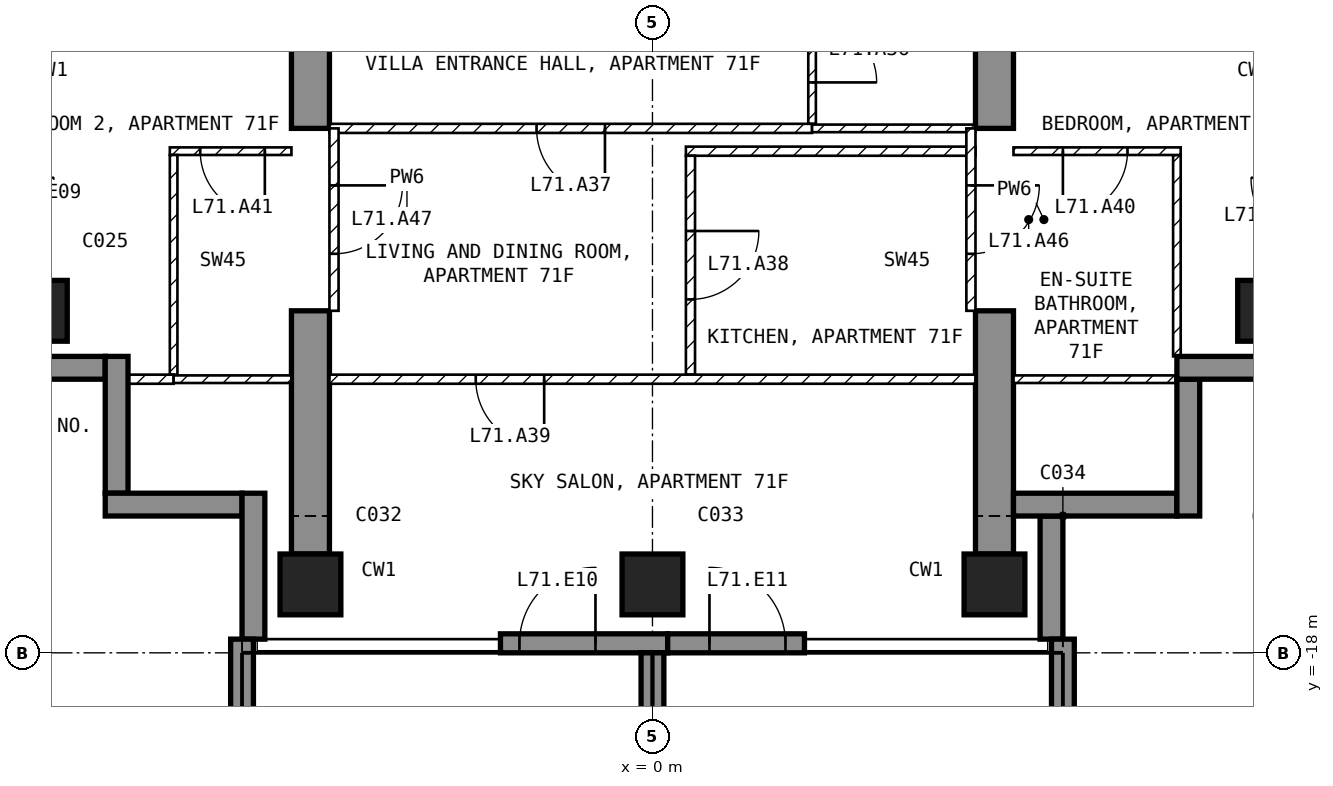
"""IFC4 building model, lengths in metres.
Left out: names, types, materials, properties, quantities, classifications, styles, units other than length and angle.
Written with IfcOpenShell. Run it as: python <this file> out.ifc"""

import sys

from ifc_helpers import new_model, si_unit, direction, frame, frame_2d, origin, origin_2d, place, context, subcontext, project, spatial, polyline, rectangle, outline, extrude, element, fill, save


model = new_model("IFC4")
c1 = context("Model", 3, precision=1e-05, world=origin(), true_north=direction((0.0, 1.0)))
c2 = subcontext(c1, "Body", "Model", "MODEL_VIEW")
j1 = project(units=[si_unit("LENGTHUNIT", "METRE"), si_unit("PLANEANGLEUNIT", "RADIAN")], contexts=[c1])
p1 = place(None, origin())
s1 = spatial("IfcSite", under=j1, at=p1, CompositionType="ELEMENT")
p2 = place(p1, origin())
s2 = spatial("IfcBuilding", under=s1, at=p2, CompositionType="ELEMENT")
p3 = place(p2, frame((0.0, 0.0, 278.0)))
s3 = spatial("IfcBuildingStorey", under=s2, at=p3, CompositionType="ELEMENT", Elevation=278.0)
for number, where, z_axis, x_axis in (
    (1, (-8.1, -13.5, -0.25), (0.0, 0.0, 1.0), (1.0, 0.0, 0.0)),
    (2, (-4.5, -17.1, -0.25), (0.0, 0.0, 1.0), (1.0, 0.0, 0.0)),
    (3, (0.0, -17.1, -0.25), (0.0, 0.0, 1.0), (1.0, 0.0, 0.0)),
    (4, (4.5, -17.1, -0.25), (0.0, 0.0, 1.0), (1.0, 0.0, 0.0)),
    (5, (8.1, -13.5, -0.25), (0.0, 0.0, 1.0), (1.0, 0.0, 0.0)),
):
    element("IfcColumn", number, at=place(p3, frame(where, z_axis=z_axis, x_axis=x_axis)), inside=s3, PredefinedType="COLUMN", context=c2, shape_type="SweptSolid", body=[
        extrude(rectangle(XDim=0.8, YDim=0.8, at=origin_2d()), origin(), (0.0, 0.0, 1.0), 3.5),
    ])
for number, where, z_axis, x_axis in (
    (6, (-4.75, -16.7, -0.25), (1.0, 0.0, 0.0), (0.0, 1.0, 0.0)),
    (7, (4.25, -16.7, -0.25), (1.0, 0.0, 0.0), (0.0, 1.0, 0.0)),
):
    element("IfcWall", number, at=place(p3, frame(where, z_axis=z_axis, x_axis=x_axis)), inside=s3, PredefinedType="SHEAR", context=c2, shape_type="SweptSolid", body=[
        extrude(outline(polyline([(0.0, 0.0), (3.2, 0.0), (3.2, 2.65), (5.6, 2.65), (5.6, 0.0), (7.7, 0.0), (7.7, 3.5), (0.0, 3.5), (0.0, 0.0)])), origin(), (0.0, 0.0, 1.0), 0.5),
    ])
p4 = place(p3, frame((-2.0, -17.875, 0.0), z_axis=(0.0, 0.0, 1.0), x_axis=(1.0, 0.0, 0.0)))
e8 = element("IfcWall", 8, at=p4, inside=s3, PredefinedType="SOLIDWALL", context=c2, shape_type="SweptSolid", body=[
    extrude(rectangle(XDim=2.2, YDim=0.25, at=frame_2d((1.1, 0.0))), origin(), (0.0, 0.0, 1.0), 3.25),
])
p5 = place(p4, frame((0.25, 0.0, 0.0)))
e9 = element("IfcOpeningElement", 9, at=p5, cuts=e8, PredefinedType="OPENING", context=c2, shape_type="SweptSolid", body=[
    extrude(rectangle(XDim=1.0, YDim=2.4, at=frame_2d((0.5, 1.2))), frame((0.0, 0.135, 0.0), z_axis=(0.0, -1.0, 0.0), x_axis=(1.0, 0.0, 0.0)), (0.0, 0.0, 1.0), 0.27),
])
p6 = place(p3, frame((0.2, -17.875, 0.0), z_axis=(0.0, 0.0, 1.0), x_axis=(1.0, 0.0, 0.0)))
e10 = element("IfcWall", 10, at=p6, inside=s3, PredefinedType="SOLIDWALL", context=c2, shape_type="SweptSolid", body=[
    extrude(rectangle(XDim=1.8, YDim=0.25, at=frame_2d((0.9, 0.0))), origin(), (0.0, 0.0, 1.0), 3.25),
])
p7 = place(p6, frame((0.55, 0.0, 0.0)))
e11 = element("IfcOpeningElement", 11, at=p7, cuts=e10, PredefinedType="OPENING", context=c2, shape_type="SweptSolid", body=[
    extrude(rectangle(XDim=1.0, YDim=2.4, at=frame_2d((0.5, 1.2))), frame((0.0, 0.135, 0.0), z_axis=(0.0, -1.0, 0.0), x_axis=(1.0, 0.0, 0.0)), (0.0, 0.0, 1.0), 0.27),
])
p8 = place(p3, frame((5.25, -17.82, 0.0), z_axis=(0.0, 0.0, 1.0), x_axis=(0.0, 1.0, 0.0)))
e12 = element("IfcWall", 12, at=p8, inside=s3, PredefinedType="SOLIDWALL", context=c2, shape_type="SweptSolid", body=[
    extrude(rectangle(XDim=1.62, YDim=0.3, at=frame_2d((0.81, 0.0))), origin(), (0.0, 0.0, 1.0), 3.25),
])
p9 = place(p3, frame((4.75, -16.05, 0.0), z_axis=(0.0, 0.0, 1.0), x_axis=(1.0, 0.0, 0.0)))
e13 = element("IfcWall", 13, at=p9, inside=s3, PredefinedType="SOLIDWALL", context=c2, shape_type="SweptSolid", body=[
    extrude(rectangle(XDim=2.15, YDim=0.3, at=frame_2d((1.075, 0.0))), origin(), (0.0, 0.0, 1.0), 3.25),
])
p10 = place(p3, frame((7.05, -16.2, 0.0), z_axis=(0.0, 0.0, 1.0), x_axis=(0.0, 1.0, 0.0)))
e14 = element("IfcWall", 14, at=p10, inside=s3, PredefinedType="SOLIDWALL", context=c2, shape_type="SweptSolid", body=[
    extrude(rectangle(XDim=1.8, YDim=0.3, at=frame_2d((0.9, 0.0))), origin(), (0.0, 0.0, 1.0), 3.25),
])
p11 = place(p3, frame((6.9, -14.25, 0.0), z_axis=(0.0, 0.0, 1.0), x_axis=(1.0, 0.0, 0.0)))
e15 = element("IfcWall", 15, at=p11, inside=s3, PredefinedType="SOLIDWALL", context=c2, shape_type="SweptSolid", body=[
    extrude(rectangle(XDim=1.85, YDim=0.3, at=frame_2d((0.925, 0.0))), origin(), (0.0, 0.0, 1.0), 3.25),
])
p12 = place(p3, frame((-8.75, -14.25, 0.0), z_axis=(0.0, 0.0, 1.0), x_axis=(1.0, 0.0, 0.0)))
e16 = element("IfcWall", 16, at=p12, inside=s3, PredefinedType="SOLIDWALL", context=c2, shape_type="SweptSolid", body=[
    extrude(rectangle(XDim=1.55, YDim=0.3, at=frame_2d((0.775, 0.0))), origin(), (0.0, 0.0, 1.0), 3.25),
])
p13 = place(p3, frame((-7.05, -14.1, 0.0), z_axis=(0.0, 0.0, 1.0), x_axis=(0.0, -1.0, 0.0)))
e17 = element("IfcWall", 17, at=p13, inside=s3, PredefinedType="SOLIDWALL", context=c2, shape_type="SweptSolid", body=[
    extrude(rectangle(XDim=1.8, YDim=0.3, at=frame_2d((0.9, 0.0))), origin(), (0.0, 0.0, 1.0), 3.25),
])
p14 = place(p3, frame((-7.2, -16.05, 0.0), z_axis=(0.0, 0.0, 1.0), x_axis=(1.0, 0.0, 0.0)))
e18 = element("IfcWall", 18, at=p14, inside=s3, PredefinedType="SOLIDWALL", context=c2, shape_type="SweptSolid", body=[
    extrude(rectangle(XDim=1.8, YDim=0.3, at=frame_2d((0.9, 0.0))), origin(), (0.0, 0.0, 1.0), 3.25),
])
p15 = place(p3, frame((-5.25, -15.9, 0.0), z_axis=(0.0, 0.0, 1.0), x_axis=(0.0, -1.0, 0.0)))
e19 = element("IfcWall", 19, at=p15, inside=s3, PredefinedType="SOLIDWALL", context=c2, shape_type="SweptSolid", body=[
    extrude(rectangle(XDim=1.92, YDim=0.3, at=frame_2d((0.96, 0.0))), origin(), (0.0, 0.0, 1.0), 3.25),
])
p16 = place(p3, frame((-5.4, -17.82, 0.0), z_axis=(0.0, 0.0, 1.0), x_axis=(0.0, -1.0, 0.0)))
e20 = element("IfcWall", 20, at=p16, inside=s3, PredefinedType="SOLIDWALL", context=c2, shape_type="SweptSolid", body=[
    extrude(rectangle(XDim=2.88, YDim=0.3, at=frame_2d((1.44, 0.0))), origin(), (0.0, 0.0, 1.0), 3.25),
])
p17 = place(p3, frame((0.0, -18.0, 0.0), z_axis=(0.0, 0.0, 1.0), x_axis=(0.0, -1.0, 0.0)))
e21 = element("IfcWall", 21, at=p17, inside=s3, PredefinedType="SOLIDWALL", context=c2, shape_type="SweptSolid", body=[
    extrude(rectangle(XDim=2.7, YDim=0.3, at=frame_2d((1.35, 0.0))), origin(), (0.0, 0.0, 1.0), 3.25),
])
p18 = place(p3, frame((5.4, -17.82, 0.0), z_axis=(0.0, 0.0, 1.0), x_axis=(0.0, -1.0, 0.0)))
e22 = element("IfcWall", 22, at=p18, inside=s3, PredefinedType="SOLIDWALL", context=c2, shape_type="SweptSolid", body=[
    extrude(rectangle(XDim=2.88, YDim=0.3, at=frame_2d((1.44, 0.0))), origin(), (0.0, 0.0, 1.0), 3.25),
])
p19 = place(p3, frame((2.1, -9.1, 0.0), z_axis=(0.0, 0.0, 1.0), x_axis=(0.0, -1.0, 0.0)))
e23 = element("IfcWall", 23, at=p19, inside=s3, PredefinedType="PARTITIONING", context=c2, shape_type="SweptSolid", body=[
    extrude(rectangle(XDim=1.94, YDim=0.1, at=frame_2d((0.97, 0.0))), origin(), (0.0, 0.0, 1.0), 3.25),
])
p20 = place(p19, frame((0.545, 0.0, 0.0)))
e24 = element("IfcOpeningElement", 24, at=p20, cuts=e23, PredefinedType="OPENING", context=c2, shape_type="SweptSolid", body=[
    extrude(rectangle(XDim=0.85, YDim=2.1, at=frame_2d((0.425, 1.05))), frame((0.0, 0.06, 0.0), z_axis=(0.0, -1.0, 0.0), x_axis=(1.0, 0.0, 0.0)), (0.0, 0.0, 1.0), 0.12),
])
p21 = place(p3, frame((2.1, -11.1, 0.0), z_axis=(0.0, 0.0, 1.0), x_axis=(-1.0, 0.0, 0.0)))
e25 = element("IfcWall", 25, at=p21, inside=s3, PredefinedType="PARTITIONING", context=c2, shape_type="SweptSolid", body=[
    extrude(rectangle(XDim=6.35, YDim=0.12, at=frame_2d((3.175, 0.0))), origin(), (0.0, 0.0, 1.0), 3.25),
])
p22 = place(p21, frame((2.725, 0.0, 0.0)))
e26 = element("IfcOpeningElement", 26, at=p22, cuts=e25, PredefinedType="OPENING", context=c2, shape_type="SweptSolid", body=[
    extrude(rectangle(XDim=0.9, YDim=2.1, at=frame_2d((0.45, 1.05))), frame((0.0, 0.07, 0.0), z_axis=(0.0, -1.0, 0.0), x_axis=(1.0, 0.0, 0.0)), (0.0, 0.0, 1.0), 0.14),
])
p23 = place(p3, frame((4.25, -11.1, 0.0), z_axis=(0.0, 0.0, 1.0), x_axis=(-1.0, 0.0, 0.0)))
e27 = element("IfcWall", 27, at=p23, inside=s3, PredefinedType="PARTITIONING", context=c2, shape_type="SweptSolid", body=[
    extrude(rectangle(XDim=2.15, YDim=0.1, at=frame_2d((1.075, 0.0))), origin(), (0.0, 0.0, 1.0), 3.25),
])
p24 = place(p3, frame((4.25, -11.4, 0.0), z_axis=(0.0, 0.0, 1.0), x_axis=(-1.0, 0.0, 0.0)))
e28 = element("IfcWall", 28, at=p24, inside=s3, PredefinedType="PARTITIONING", context=c2, shape_type="SweptSolid", body=[
    extrude(rectangle(XDim=3.81, YDim=0.12, at=frame_2d((1.905, 0.0))), origin(), (0.0, 0.0, 1.0), 3.25),
])
p25 = place(p3, frame((0.5, -11.46, 0.0), z_axis=(0.0, 0.0, 1.0), x_axis=(0.0, -1.0, 0.0)))
e29 = element("IfcWall", 29, at=p25, inside=s3, PredefinedType="PARTITIONING", context=c2, shape_type="SweptSolid", body=[
    extrude(rectangle(XDim=2.88, YDim=0.12, at=frame_2d((1.44, 0.0))), origin(), (0.0, 0.0, 1.0), 3.25),
])
p26 = place(p25, frame((0.99, 0.0, 0.0)))
e30 = element("IfcOpeningElement", 30, at=p26, cuts=e29, PredefinedType="OPENING", context=c2, shape_type="SweptSolid", body=[
    extrude(rectangle(XDim=0.9, YDim=2.1, at=frame_2d((0.45, 1.05))), frame((0.0, 0.07, 0.0), z_axis=(0.0, -1.0, 0.0), x_axis=(1.0, 0.0, 0.0)), (0.0, 0.0, 1.0), 0.14),
])
p27 = place(p3, frame((4.25, -14.4, 0.0), z_axis=(0.0, 0.0, 1.0), x_axis=(-1.0, 0.0, 0.0)))
e31 = element("IfcWall", 31, at=p27, inside=s3, PredefinedType="PARTITIONING", context=c2, shape_type="SweptSolid", body=[
    extrude(rectangle(XDim=8.5, YDim=0.12, at=frame_2d((4.25, 0.0))), origin(), (0.0, 0.0, 1.0), 3.25),
])
p28 = place(p27, frame((5.675, 0.0, 0.0)))
e32 = element("IfcOpeningElement", 32, at=p28, cuts=e31, PredefinedType="OPENING", context=c2, shape_type="SweptSolid", body=[
    extrude(rectangle(XDim=0.9, YDim=2.1, at=frame_2d((0.45, 1.05))), frame((0.0, 0.07, 0.0), z_axis=(0.0, -1.0, 0.0), x_axis=(1.0, 0.0, 0.0)), (0.0, 0.0, 1.0), 0.14),
])
p29 = place(p3, frame((6.9, -14.1, 0.0), z_axis=(0.0, 0.0, 1.0), x_axis=(0.0, 1.0, 0.0)))
e33 = element("IfcWall", 33, at=p29, inside=s3, PredefinedType="PARTITIONING", context=c2, shape_type="SweptSolid", body=[
    extrude(rectangle(XDim=2.65, YDim=0.1, at=frame_2d((1.325, 0.0))), origin(), (0.0, 0.0, 1.0), 3.25),
])
p30 = place(p3, frame((6.95, -11.4, 0.0), z_axis=(0.0, 0.0, 1.0), x_axis=(-1.0, 0.0, 0.0)))
e34 = element("IfcWall", 34, at=p30, inside=s3, PredefinedType="PARTITIONING", context=c2, shape_type="SweptSolid", body=[
    extrude(rectangle(XDim=2.2, YDim=0.1, at=frame_2d((1.1, 0.0))), origin(), (0.0, 0.0, 1.0), 3.25),
])
p31 = place(p30, frame((0.7, 0.0, 0.0)))
e35 = element("IfcOpeningElement", 35, at=p31, cuts=e34, PredefinedType="OPENING", context=c2, shape_type="SweptSolid", body=[
    extrude(rectangle(XDim=0.85, YDim=2.1, at=frame_2d((0.425, 1.05))), frame((0.0, 0.06, 0.0), z_axis=(0.0, -1.0, 0.0), x_axis=(1.0, 0.0, 0.0)), (0.0, 0.0, 1.0), 0.12),
])
p32 = place(p3, frame((7.12, -14.4, 0.0), z_axis=(0.0, 0.0, 1.0), x_axis=(-1.0, 0.0, 0.0)))
e36 = element("IfcWall", 36, at=p32, inside=s3, PredefinedType="PARTITIONING", context=c2, shape_type="SweptSolid", body=[
    extrude(rectangle(XDim=2.37, YDim=0.1, at=frame_2d((1.185, 0.0))), origin(), (0.0, 0.0, 1.0), 3.25),
])
p33 = place(p3, frame((-4.75, -11.4, 0.0), z_axis=(0.0, 0.0, 1.0), x_axis=(-1.0, 0.0, 0.0)))
e37 = element("IfcWall", 37, at=p33, inside=s3, PredefinedType="PARTITIONING", context=c2, shape_type="SweptSolid", body=[
    extrude(rectangle(XDim=1.6, YDim=0.1, at=frame_2d((0.8, 0.0))), origin(), (0.0, 0.0, 1.0), 3.25),
])
p34 = place(p33, frame((0.35, 0.0, 0.0)))
e38 = element("IfcOpeningElement", 38, at=p34, cuts=e37, PredefinedType="OPENING", context=c2, shape_type="SweptSolid", body=[
    extrude(rectangle(XDim=0.85, YDim=2.1, at=frame_2d((0.425, 1.05))), frame((0.0, 0.06, 0.0), z_axis=(0.0, -1.0, 0.0), x_axis=(1.0, 0.0, 0.0)), (0.0, 0.0, 1.0), 0.12),
])
p35 = place(p3, frame((-6.3, -11.45, 0.0), z_axis=(0.0, 0.0, 1.0), x_axis=(0.0, -1.0, 0.0)))
e39 = element("IfcWall", 39, at=p35, inside=s3, PredefinedType="PARTITIONING", context=c2, shape_type="SweptSolid", body=[
    extrude(rectangle(XDim=2.89, YDim=0.1, at=frame_2d((1.445, 0.0))), origin(), (0.0, 0.0, 1.0), 3.25),
])
p36 = place(p3, frame((-6.3, -14.4, 0.0), z_axis=(0.0, 0.0, 1.0), x_axis=(-1.0, 0.0, 0.0)))
e40 = element("IfcWall", 40, at=p36, inside=s3, PredefinedType="PARTITIONING", context=c2, shape_type="SweptSolid", body=[
    extrude(rectangle(XDim=0.82, YDim=0.12, at=frame_2d((0.41, 0.0))), origin(), (0.0, 0.0, 1.0), 3.25),
])
p37 = place(p3, frame((-4.75, -14.4, 0.0), z_axis=(0.0, 0.0, 1.0), x_axis=(-1.0, 0.0, 0.0)))
e41 = element("IfcWall", 41, at=p37, inside=s3, PredefinedType="PARTITIONING", context=c2, shape_type="SweptSolid", body=[
    extrude(rectangle(XDim=1.55, YDim=0.1, at=frame_2d((0.775, 0.0))), origin(), (0.0, 0.0, 1.0), 3.25),
])
p38 = place(p3, frame((4.19, -11.1, 0.0), z_axis=(0.0, 0.0, 1.0), x_axis=(0.0, -1.0, 0.0)))
e42 = element("IfcWall", 42, at=p38, inside=s3, PredefinedType="PARTITIONING", context=c2, shape_type="SweptSolid", body=[
    extrude(rectangle(XDim=2.4, YDim=0.12, at=frame_2d((1.2, 0.0))), origin(), (0.0, 0.0, 1.0), 2.4),
])
p39 = place(p38, frame((0.75, 0.0, 0.0)))
e43 = element("IfcOpeningElement", 43, at=p39, cuts=e42, PredefinedType="OPENING", context=c2, shape_type="SweptSolid", body=[
    extrude(rectangle(XDim=0.9, YDim=2.1, at=frame_2d((0.45, 1.05))), frame((0.0, 0.07, 0.0), z_axis=(0.0, -1.0, 0.0), x_axis=(1.0, 0.0, 0.0)), (0.0, 0.0, 1.0), 0.14),
])
p40 = place(p3, frame((-4.19, -11.1, 0.0), z_axis=(0.0, 0.0, 1.0), x_axis=(0.0, -1.0, 0.0)))
e44 = element("IfcWall", 44, at=p40, inside=s3, PredefinedType="PARTITIONING", context=c2, shape_type="SweptSolid", body=[
    extrude(rectangle(XDim=2.4, YDim=0.12, at=frame_2d((1.2, 0.0))), origin(), (0.0, 0.0, 1.0), 2.4),
])
p41 = place(p40, frame((0.75, 0.0, 0.0)))
e45 = element("IfcOpeningElement", 45, at=p41, cuts=e44, PredefinedType="OPENING", context=c2, shape_type="SweptSolid", body=[
    extrude(rectangle(XDim=0.9, YDim=2.1, at=frame_2d((0.45, 1.05))), frame((0.0, 0.07, 0.0), z_axis=(0.0, -1.0, 0.0), x_axis=(1.0, 0.0, 0.0)), (0.0, 0.0, 1.0), 0.14),
])
p42 = place(p5, origin())
e46 = element("IfcDoor", 46, at=p42, inside=s3, OperationType="SINGLE_SWING_RIGHT", PredefinedType="DOOR", context=c2, shape_type="SweptSolid", body=[
    extrude(rectangle(XDim=1.0, YDim=2.4, at=frame_2d((0.5, 1.2))), frame((0.0, 0.025, 0.0), z_axis=(0.0, -1.0, 0.0), x_axis=(1.0, 0.0, 0.0)), (0.0, 0.0, 1.0), 0.05),
])
fill(e9, e46)
p43 = place(p7, origin())
e47 = element("IfcDoor", 47, at=p43, inside=s3, OperationType="SINGLE_SWING_LEFT", PredefinedType="DOOR", context=c2, shape_type="SweptSolid", body=[
    extrude(rectangle(XDim=1.0, YDim=2.4, at=frame_2d((0.5, 1.2))), frame((0.0, 0.025, 0.0), z_axis=(0.0, -1.0, 0.0), x_axis=(1.0, 0.0, 0.0)), (0.0, 0.0, 1.0), 0.05),
])
fill(e11, e47)
p44 = place(p20, origin())
e48 = element("IfcDoor", 48, at=p44, inside=s3, OperationType="SINGLE_SWING_RIGHT", PredefinedType="DOOR", context=c2, shape_type="SweptSolid", body=[
    extrude(rectangle(XDim=0.85, YDim=2.1, at=frame_2d((0.425, 1.05))), frame((0.0, 0.025, 0.0), z_axis=(0.0, -1.0, 0.0), x_axis=(1.0, 0.0, 0.0)), (0.0, 0.0, 1.0), 0.05),
])
fill(e24, e48)
p45 = place(p22, origin())
e49 = element("IfcDoor", 49, at=p45, inside=s3, OperationType="SINGLE_SWING_LEFT", PredefinedType="DOOR", context=c2, shape_type="SweptSolid", body=[
    extrude(rectangle(XDim=0.9, YDim=2.1, at=frame_2d((0.45, 1.05))), frame((0.0, 0.025, 0.0), z_axis=(0.0, -1.0, 0.0), x_axis=(1.0, 0.0, 0.0)), (0.0, 0.0, 1.0), 0.05),
])
fill(e26, e49)
p46 = place(p26, origin())
e50 = element("IfcDoor", 50, at=p46, inside=s3, OperationType="SINGLE_SWING_LEFT", PredefinedType="DOOR", context=c2, shape_type="SweptSolid", body=[
    extrude(rectangle(XDim=0.9, YDim=2.1, at=frame_2d((0.45, 1.05))), frame((0.0, 0.025, 0.0), z_axis=(0.0, -1.0, 0.0), x_axis=(1.0, 0.0, 0.0)), (0.0, 0.0, 1.0), 0.05),
])
fill(e30, e50)
p47 = place(p28, origin())
e51 = element("IfcDoor", 51, at=p47, inside=s3, OperationType="SINGLE_SWING_LEFT", PredefinedType="DOOR", context=c2, shape_type="SweptSolid", body=[
    extrude(rectangle(XDim=0.9, YDim=2.1, at=frame_2d((0.45, 1.05))), frame((0.0, 0.025, 0.0), z_axis=(0.0, -1.0, 0.0), x_axis=(1.0, 0.0, 0.0)), (0.0, 0.0, 1.0), 0.05),
])
fill(e32, e51)
p48 = place(p31, origin())
e52 = element("IfcDoor", 52, at=p48, inside=s3, OperationType="SINGLE_SWING_RIGHT", PredefinedType="DOOR", context=c2, shape_type="SweptSolid", body=[
    extrude(rectangle(XDim=0.85, YDim=2.1, at=frame_2d((0.425, 1.05))), frame((0.0, 0.025, 0.0), z_axis=(0.0, -1.0, 0.0), x_axis=(1.0, 0.0, 0.0)), (0.0, 0.0, 1.0), 0.05),
])
fill(e35, e52)
p49 = place(p34, origin())
e53 = element("IfcDoor", 53, at=p49, inside=s3, OperationType="SINGLE_SWING_LEFT", PredefinedType="DOOR", context=c2, shape_type="SweptSolid", body=[
    extrude(rectangle(XDim=0.85, YDim=2.1, at=frame_2d((0.425, 1.05))), frame((0.0, 0.025, 0.0), z_axis=(0.0, -1.0, 0.0), x_axis=(1.0, 0.0, 0.0)), (0.0, 0.0, 1.0), 0.05),
])
fill(e38, e53)
p50 = place(p39, origin())
e54 = element("IfcDoor", 54, at=p50, inside=s3, OperationType="SINGLE_SWING_LEFT", PredefinedType="DOOR", context=c2, shape_type="SweptSolid", body=[
    extrude(rectangle(XDim=0.9, YDim=2.1, at=frame_2d((0.45, 1.05))), frame((0.0, 0.025, 0.0), z_axis=(0.0, -1.0, 0.0), x_axis=(1.0, 0.0, 0.0)), (0.0, 0.0, 1.0), 0.05),
])
fill(e43, e54)
p51 = place(p41, origin())
e55 = element("IfcDoor", 55, at=p51, inside=s3, OperationType="SINGLE_SWING_LEFT", PredefinedType="DOOR", context=c2, shape_type="SweptSolid", body=[
    extrude(rectangle(XDim=0.9, YDim=2.1, at=frame_2d((0.45, 1.05))), frame((0.0, 0.025, 0.0), z_axis=(0.0, -1.0, 0.0), x_axis=(1.0, 0.0, 0.0)), (0.0, 0.0, 1.0), 0.05),
])
fill(e45, e55)
save(model, sys.argv[1])
